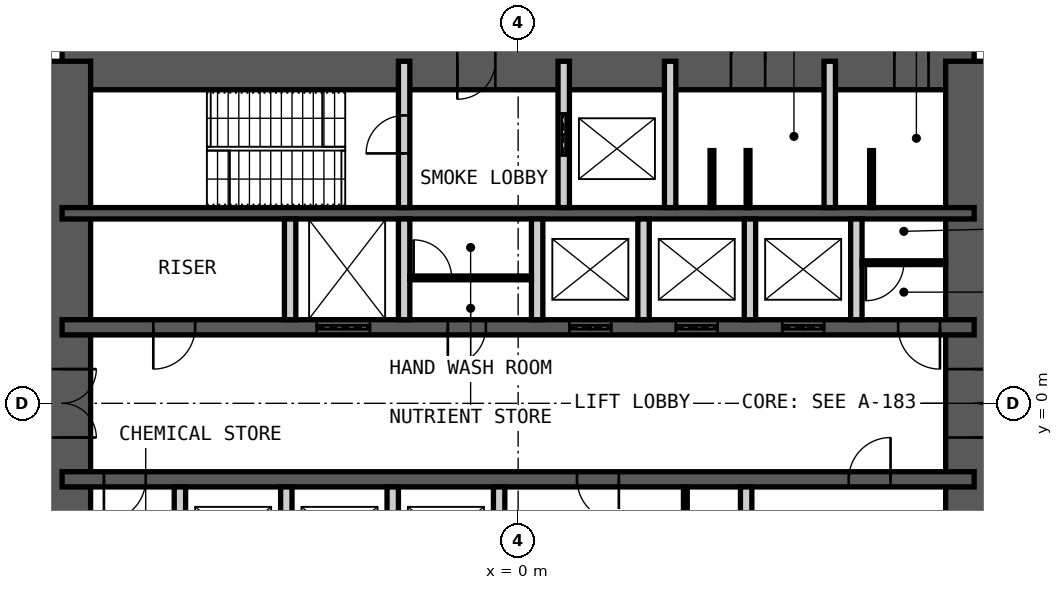
"""IFC4 building model, lengths in metres.
Left out: names, types, materials, properties, quantities, classifications, styles, units other than length and angle.
Written with IfcOpenShell. Run it as: python <this file> out.ifc"""

import sys

from ifc_helpers import new_model, si_unit, direction, frame, frame_2d, origin, place, context, subcontext, project, spatial, rectangle, extrude, element, fill, save


model = new_model("IFC4")
c1 = context("Model", 3, precision=1e-05, world=origin(), true_north=direction((0.0, 1.0)))
c2 = subcontext(c1, "Body", "Model", "MODEL_VIEW")
j1 = project(units=[si_unit("LENGTHUNIT", "METRE"), si_unit("PLANEANGLEUNIT", "RADIAN")], contexts=[c1])
p1 = place(None, origin())
s1 = spatial("IfcSite", under=j1, at=p1, CompositionType="ELEMENT")
p2 = place(p1, origin())
s2 = spatial("IfcBuilding", under=s1, at=p2, CompositionType="ELEMENT")
p3 = place(p2, frame((0.0, 0.0, 17.0)))
s3 = spatial("IfcBuildingStorey", under=s2, at=p3, CompositionType="ELEMENT", Elevation=17.0)
p4 = place(p3, frame((-12.0, 9.0, 0.0), z_axis=(0.0, 0.0, 1.0), x_axis=(1.0, 0.0, 0.0)))
e1 = element("IfcWall", 1, at=p4, inside=s3, PredefinedType="SHEAR", context=c2, shape_type="SweptSolid", body=[
    extrude(rectangle(XDim=24.0, YDim=1.5, at=frame_2d((12.0, 0.0))), origin(), (0.0, 0.0, 1.0), 5.0),
])
p5 = place(p4, frame((10.4, 0.0, 0.0)))
e2 = element("IfcOpeningElement", 2, at=p5, cuts=e1, PredefinedType="OPENING", context=c2, shape_type="SweptSolid", body=[
    extrude(rectangle(XDim=1.0, YDim=2.1, at=frame_2d((0.5, 1.05))), frame((0.0, 0.76, 0.0), z_axis=(0.0, -1.0, 0.0), x_axis=(1.0, 0.0, 0.0)), (0.0, 0.0, 1.0), 1.52),
])
p6 = place(p4, frame((17.6, 0.0, 0.0)))
e3 = element("IfcOpeningElement", 3, at=p6, cuts=e1, PredefinedType="OPENING", context=c2, shape_type="SweptSolid", body=[
    extrude(rectangle(XDim=0.9, YDim=2.1, at=frame_2d((0.45, 1.05))), frame((0.0, 0.76, 0.0), z_axis=(0.0, -1.0, 0.0), x_axis=(1.0, 0.0, 0.0)), (0.0, 0.0, 1.0), 1.52),
])
p7 = place(p4, frame((21.9, 0.0, 0.0)))
e4 = element("IfcOpeningElement", 4, at=p7, cuts=e1, PredefinedType="OPENING", context=c2, shape_type="SweptSolid", body=[
    extrude(rectangle(XDim=0.9, YDim=2.1, at=frame_2d((0.45, 1.05))), frame((0.0, 0.76, 0.0), z_axis=(0.0, -1.0, 0.0), x_axis=(1.0, 0.0, 0.0)), (0.0, 0.0, 1.0), 1.52),
])
p8 = place(p3, frame((12.0, -9.0, 0.0), z_axis=(0.0, 0.0, 1.0), x_axis=(0.0, 1.0, 0.0)))
e5 = element("IfcWall", 5, at=p8, inside=s3, PredefinedType="SHEAR", context=c2, shape_type="SweptSolid", body=[
    extrude(rectangle(XDim=18.0, YDim=1.5, at=frame_2d((9.0, 0.0))), origin(), (0.0, 0.0, 1.0), 5.0),
])
p9 = place(p8, frame((8.1, 0.0, 0.0)))
e6 = element("IfcOpeningElement", 6, at=p9, cuts=e5, PredefinedType="OPENING", context=c2, shape_type="SweptSolid", body=[
    extrude(rectangle(XDim=1.8, YDim=2.1, at=frame_2d((0.9, 1.05))), frame((0.0, 0.76, 0.0), z_axis=(0.0, -1.0, 0.0), x_axis=(1.0, 0.0, 0.0)), (0.0, 0.0, 1.0), 1.52),
])
p10 = place(p3, frame((-12.0, -9.0, 0.0), z_axis=(0.0, 0.0, 1.0), x_axis=(0.0, 1.0, 0.0)))
e7 = element("IfcWall", 7, at=p10, inside=s3, PredefinedType="SHEAR", context=c2, shape_type="SweptSolid", body=[
    extrude(rectangle(XDim=18.0, YDim=1.5, at=frame_2d((9.0, 0.0))), origin(), (0.0, 0.0, 1.0), 5.0),
])
p11 = place(p10, frame((8.1, 0.0, 0.0)))
e8 = element("IfcOpeningElement", 8, at=p11, cuts=e7, PredefinedType="OPENING", context=c2, shape_type="SweptSolid", body=[
    extrude(rectangle(XDim=1.8, YDim=2.1, at=frame_2d((0.9, 1.05))), frame((0.0, 0.76, 0.0), z_axis=(0.0, -1.0, 0.0), x_axis=(1.0, 0.0, 0.0)), (0.0, 0.0, 1.0), 1.52),
])
p12 = place(p3, frame((-12.0, 5.0, 0.0), z_axis=(0.0, 0.0, 1.0), x_axis=(1.0, 0.0, 0.0)))
e9 = element("IfcWall", 9, at=p12, inside=s3, PredefinedType="SHEAR", context=c2, shape_type="SweptSolid", body=[
    extrude(rectangle(XDim=24.0, YDim=0.3, at=frame_2d((12.0, 0.0))), origin(), (0.0, 0.0, 1.0), 5.0),
])
p13 = place(p3, frame((-12.0, 2.0, 0.0), z_axis=(0.0, 0.0, 1.0), x_axis=(1.0, 0.0, 0.0)))
e10 = element("IfcWall", 10, at=p13, inside=s3, PredefinedType="SHEAR", context=c2, shape_type="SweptSolid", body=[
    extrude(rectangle(XDim=24.0, YDim=0.4, at=frame_2d((12.0, 0.0))), origin(), (0.0, 0.0, 1.0), 5.0),
])
p14 = place(p13, frame((2.4, 0.0, 0.0)))
e11 = element("IfcOpeningElement", 11, at=p14, cuts=e10, PredefinedType="OPENING", context=c2, shape_type="SweptSolid", body=[
    extrude(rectangle(XDim=1.1, YDim=2.1, at=frame_2d((0.55, 1.05))), frame((0.0, 0.21, 0.0), z_axis=(0.0, -1.0, 0.0), x_axis=(1.0, 0.0, 0.0)), (0.0, 0.0, 1.0), 0.42),
])
p15 = place(p13, frame((22.0, 0.0, 0.0)))
e12 = element("IfcOpeningElement", 12, at=p15, cuts=e10, PredefinedType="OPENING", context=c2, shape_type="SweptSolid", body=[
    extrude(rectangle(XDim=1.1, YDim=2.1, at=frame_2d((0.55, 1.05))), frame((0.0, 0.21, 0.0), z_axis=(0.0, -1.0, 0.0), x_axis=(1.0, 0.0, 0.0)), (0.0, 0.0, 1.0), 0.42),
])
p16 = place(p13, frame((10.15, 0.0, 0.0)))
e13 = element("IfcOpeningElement", 13, at=p16, cuts=e10, PredefinedType="OPENING", context=c2, shape_type="SweptSolid", body=[
    extrude(rectangle(XDim=1.0, YDim=2.1, at=frame_2d((0.5, 1.05))), frame((0.0, 0.21, 0.0), z_axis=(0.0, -1.0, 0.0), x_axis=(1.0, 0.0, 0.0)), (0.0, 0.0, 1.0), 0.42),
])
p17 = place(p13, frame((6.7, 0.0, 0.0)))
e14 = element("IfcOpeningElement", 14, at=p17, cuts=e10, PredefinedType="OPENING", context=c2, shape_type="SweptSolid", body=[
    extrude(rectangle(XDim=1.4, YDim=2.4, at=frame_2d((0.7, 1.2))), frame((0.0, 0.21, 0.0), z_axis=(0.0, -1.0, 0.0), x_axis=(1.0, 0.0, 0.0)), (0.0, 0.0, 1.0), 0.42),
])
p18 = place(p13, frame((13.35, 0.0, 0.0)))
e15 = element("IfcOpeningElement", 15, at=p18, cuts=e10, PredefinedType="OPENING", context=c2, shape_type="SweptSolid", body=[
    extrude(rectangle(XDim=1.1, YDim=2.4, at=frame_2d((0.55, 1.2))), frame((0.0, 0.21, 0.0), z_axis=(0.0, -1.0, 0.0), x_axis=(1.0, 0.0, 0.0)), (0.0, 0.0, 1.0), 0.42),
])
p19 = place(p13, frame((16.15, 0.0, 0.0)))
e16 = element("IfcOpeningElement", 16, at=p19, cuts=e10, PredefinedType="OPENING", context=c2, shape_type="SweptSolid", body=[
    extrude(rectangle(XDim=1.1, YDim=2.4, at=frame_2d((0.55, 1.2))), frame((0.0, 0.21, 0.0), z_axis=(0.0, -1.0, 0.0), x_axis=(1.0, 0.0, 0.0)), (0.0, 0.0, 1.0), 0.42),
])
p20 = place(p13, frame((18.95, 0.0, 0.0)))
e17 = element("IfcOpeningElement", 17, at=p20, cuts=e10, PredefinedType="OPENING", context=c2, shape_type="SweptSolid", body=[
    extrude(rectangle(XDim=1.1, YDim=2.4, at=frame_2d((0.55, 1.2))), frame((0.0, 0.21, 0.0), z_axis=(0.0, -1.0, 0.0), x_axis=(1.0, 0.0, 0.0)), (0.0, 0.0, 1.0), 0.42),
])
p21 = place(p3, frame((-12.0, -2.0, 0.0), z_axis=(0.0, 0.0, 1.0), x_axis=(1.0, 0.0, 0.0)))
e18 = element("IfcWall", 18, at=p21, inside=s3, PredefinedType="SHEAR", context=c2, shape_type="SweptSolid", body=[
    extrude(rectangle(XDim=24.0, YDim=0.4, at=frame_2d((12.0, 0.0))), origin(), (0.0, 0.0, 1.0), 5.0),
])
p22 = place(p21, frame((1.1, 0.0, 0.0)))
e19 = element("IfcOpeningElement", 19, at=p22, cuts=e18, PredefinedType="OPENING", context=c2, shape_type="SweptSolid", body=[
    extrude(rectangle(XDim=1.1, YDim=2.1, at=frame_2d((0.55, 1.05))), frame((0.0, 0.21, 0.0), z_axis=(0.0, -1.0, 0.0), x_axis=(1.0, 0.0, 0.0)), (0.0, 0.0, 1.0), 0.42),
])
p23 = place(p21, frame((13.55, 0.0, 0.0)))
e20 = element("IfcOpeningElement", 20, at=p23, cuts=e18, PredefinedType="OPENING", context=c2, shape_type="SweptSolid", body=[
    extrude(rectangle(XDim=1.1, YDim=2.1, at=frame_2d((0.55, 1.05))), frame((0.0, 0.21, 0.0), z_axis=(0.0, -1.0, 0.0), x_axis=(1.0, 0.0, 0.0)), (0.0, 0.0, 1.0), 0.42),
])
p24 = place(p21, frame((20.7, 0.0, 0.0)))
e21 = element("IfcOpeningElement", 21, at=p24, cuts=e18, PredefinedType="OPENING", context=c2, shape_type="SweptSolid", body=[
    extrude(rectangle(XDim=1.1, YDim=2.1, at=frame_2d((0.55, 1.05))), frame((0.0, 0.21, 0.0), z_axis=(0.0, -1.0, 0.0), x_axis=(1.0, 0.0, 0.0)), (0.0, 0.0, 1.0), 0.42),
])
p25 = place(p3, frame((-3.0, 5.15, 0.0), z_axis=(0.0, 0.0, 1.0), x_axis=(0.0, 1.0, 0.0)))
e22 = element("IfcWall", 22, at=p25, inside=s3, PredefinedType="PARTITIONING", context=c2, shape_type="SweptSolid", body=[
    extrude(rectangle(XDim=3.85, YDim=0.3, at=frame_2d((1.925, 0.0))), origin(), (0.0, 0.0, 1.0), 4.78),
])
p26 = place(p25, frame((1.425, 0.0, 0.0)))
e23 = element("IfcOpeningElement", 23, at=p26, cuts=e22, PredefinedType="OPENING", context=c2, shape_type="SweptSolid", body=[
    extrude(rectangle(XDim=1.0, YDim=2.1, at=frame_2d((0.5, 1.05))), frame((0.0, 0.16, 0.0), z_axis=(0.0, -1.0, 0.0), x_axis=(1.0, 0.0, 0.0)), (0.0, 0.0, 1.0), 0.32),
])
p27 = place(p3, frame((1.2, 5.15, 0.0), z_axis=(0.0, 0.0, 1.0), x_axis=(0.0, 1.0, 0.0)))
e24 = element("IfcWall", 24, at=p27, inside=s3, PredefinedType="PARTITIONING", context=c2, shape_type="SweptSolid", body=[
    extrude(rectangle(XDim=3.85, YDim=0.3, at=frame_2d((1.925, 0.0))), origin(), (0.0, 0.0, 1.0), 4.78),
])
p28 = place(p27, frame((1.375, 0.0, 0.0)))
e25 = element("IfcOpeningElement", 25, at=p28, cuts=e24, PredefinedType="OPENING", context=c2, shape_type="SweptSolid", body=[
    extrude(rectangle(XDim=1.1, YDim=2.4, at=frame_2d((0.55, 1.2))), frame((0.0, 0.16, 0.0), z_axis=(0.0, -1.0, 0.0), x_axis=(1.0, 0.0, 0.0)), (0.0, 0.0, 1.0), 0.32),
])
for number, where, z_axis, x_axis in (
    (26, (4.0, 5.15, 0.0), (0.0, 0.0, 1.0), (0.0, 1.0, 0.0)),
    (27, (8.2, 5.15, 0.0), (0.0, 0.0, 1.0), (0.0, 1.0, 0.0)),
):
    element("IfcWall", number, at=place(p3, frame(where, z_axis=z_axis, x_axis=x_axis)), inside=s3, PredefinedType="PARTITIONING", context=c2, shape_type="SweptSolid", body=[
        extrude(rectangle(XDim=3.85, YDim=0.3, at=frame_2d((1.925, 0.0))), origin(), (0.0, 0.0, 1.0), 4.78),
    ])
for number, where, z_axis, x_axis in (
    (28, (-6.0, 2.2, 0.0), (0.0, 0.0, 1.0), (0.0, 1.0, 0.0)),
    (29, (-3.0, 2.2, 0.0), (0.0, 0.0, 1.0), (0.0, 1.0, 0.0)),
    (30, (0.5, 2.2, 0.0), (0.0, 0.0, 1.0), (0.0, 1.0, 0.0)),
    (31, (3.3, 2.2, 0.0), (0.0, 0.0, 1.0), (0.0, 1.0, 0.0)),
    (32, (6.1, 2.2, 0.0), (0.0, 0.0, 1.0), (0.0, 1.0, 0.0)),
    (33, (8.9, 2.2, 0.0), (0.0, 0.0, 1.0), (0.0, 1.0, 0.0)),
    (34, (-8.9, -4.85, 0.0), (0.0, 0.0, 1.0), (0.0, 1.0, 0.0)),
    (35, (-6.1, -4.85, 0.0), (0.0, 0.0, 1.0), (0.0, 1.0, 0.0)),
    (36, (-3.3, -4.85, 0.0), (0.0, 0.0, 1.0), (0.0, 1.0, 0.0)),
    (37, (-0.5, -4.85, 0.0), (0.0, 0.0, 1.0), (0.0, 1.0, 0.0)),
    (38, (6.0, -4.85, 0.0), (0.0, 0.0, 1.0), (0.0, 1.0, 0.0)),
):
    element("IfcWall", number, at=place(p3, frame(where, z_axis=z_axis, x_axis=x_axis)), inside=s3, PredefinedType="PARTITIONING", context=c2, shape_type="SweptSolid", body=[
        extrude(rectangle(XDim=2.65, YDim=0.3, at=frame_2d((1.325, 0.0))), origin(), (0.0, 0.0, 1.0), 4.78),
    ])
p29 = place(p3, frame((-2.85, 3.3, 0.0), z_axis=(0.0, 0.0, 1.0), x_axis=(1.0, 0.0, 0.0)))
e39 = element("IfcWall", 39, at=p29, inside=s3, PredefinedType="PARTITIONING", context=c2, shape_type="SweptSolid", body=[
    extrude(rectangle(XDim=3.2, YDim=0.1, at=frame_2d((1.6, 0.0))), origin(), (0.0, 0.0, 1.0), 4.78),
])
p30 = place(p29, frame((0.1, 0.0, 0.0)))
e40 = element("IfcOpeningElement", 40, at=p30, cuts=e39, PredefinedType="OPENING", context=c2, shape_type="SweptSolid", body=[
    extrude(rectangle(XDim=1.0, YDim=2.4, at=frame_2d((0.5, 1.2))), frame((0.0, 0.06, 0.0), z_axis=(0.0, -1.0, 0.0), x_axis=(1.0, 0.0, 0.0)), (0.0, 0.0, 1.0), 0.12),
])
p31 = place(p3, frame((4.4, -4.85, 0.0), z_axis=(0.0, 0.0, 1.0), x_axis=(0.0, 1.0, 0.0)))
e41 = element("IfcWall", 41, at=p31, inside=s3, PredefinedType="PARTITIONING", context=c2, shape_type="SweptSolid", body=[
    extrude(rectangle(XDim=2.65, YDim=0.1, at=frame_2d((1.325, 0.0))), origin(), (0.0, 0.0, 1.0), 4.78),
])
p32 = place(p31, frame((0.1, 0.0, 0.0)))
e42 = element("IfcOpeningElement", 42, at=p32, cuts=e41, PredefinedType="OPENING", context=c2, shape_type="SweptSolid", body=[
    extrude(rectangle(XDim=1.0, YDim=2.4, at=frame_2d((0.5, 1.2))), frame((0.0, 0.06, 0.0), z_axis=(0.0, -1.0, 0.0), x_axis=(1.0, 0.0, 0.0)), (0.0, 0.0, 1.0), 0.12),
])
p33 = place(p3, frame((9.05, 3.7, 0.0), z_axis=(0.0, 0.0, 1.0), x_axis=(1.0, 0.0, 0.0)))
e43 = element("IfcWall", 43, at=p33, inside=s3, PredefinedType="PARTITIONING", context=c2, shape_type="SweptSolid", body=[
    extrude(rectangle(XDim=2.2, YDim=0.1, at=frame_2d((1.1, 0.0))), origin(), (0.0, 0.0, 1.0), 4.78),
])
p34 = place(p33, frame((0.1, 0.0, 0.0)))
e44 = element("IfcOpeningElement", 44, at=p34, cuts=e43, PredefinedType="OPENING", context=c2, shape_type="SweptSolid", body=[
    extrude(rectangle(XDim=1.0, YDim=2.4, at=frame_2d((0.5, 1.2))), frame((0.0, 0.06, 0.0), z_axis=(0.0, -1.0, 0.0), x_axis=(1.0, 0.0, 0.0)), (0.0, 0.0, 1.0), 0.12),
])
for number, where, z_axis, x_axis in (
    (45, (5.1, 5.15, 0.0), (0.0, 0.0, 1.0), (0.0, 1.0, 0.0)),
    (46, (6.05, 5.15, 0.0), (0.0, 0.0, 1.0), (0.0, 1.0, 0.0)),
    (47, (9.3, 5.15, 0.0), (0.0, 0.0, 1.0), (0.0, 1.0, 0.0)),
):
    element("IfcWall", number, at=place(p3, frame(where, z_axis=z_axis, x_axis=x_axis)), inside=s3, PredefinedType="PARTITIONING", context=c2, shape_type="SweptSolid", body=[
        extrude(rectangle(XDim=1.5, YDim=0.1, at=frame_2d((0.75, 0.0))), origin(), (0.0, 0.0, 1.0), 2.1),
    ])
p35 = place(p5, origin())
e48 = element("IfcDoor", 48, at=p35, inside=s3, OperationType="SINGLE_SWING_LEFT", PredefinedType="DOOR", context=c2, shape_type="SweptSolid", body=[
    extrude(rectangle(XDim=1.0, YDim=2.1, at=frame_2d((0.5, 1.05))), frame((0.0, 0.025, 0.0), z_axis=(0.0, -1.0, 0.0), x_axis=(1.0, 0.0, 0.0)), (0.0, 0.0, 1.0), 0.05),
])
fill(e2, e48)
p36 = place(p6, origin())
e49 = element("IfcDoor", 49, at=p36, inside=s3, OperationType="SINGLE_SWING_LEFT", PredefinedType="DOOR", context=c2, shape_type="SweptSolid", body=[
    extrude(rectangle(XDim=0.9, YDim=2.1, at=frame_2d((0.45, 1.05))), frame((0.0, 0.025, 0.0), z_axis=(0.0, -1.0, 0.0), x_axis=(1.0, 0.0, 0.0)), (0.0, 0.0, 1.0), 0.05),
])
fill(e3, e49)
p37 = place(p7, origin())
e50 = element("IfcDoor", 50, at=p37, inside=s3, OperationType="SINGLE_SWING_LEFT", PredefinedType="DOOR", context=c2, shape_type="SweptSolid", body=[
    extrude(rectangle(XDim=0.9, YDim=2.1, at=frame_2d((0.45, 1.05))), frame((0.0, 0.025, 0.0), z_axis=(0.0, -1.0, 0.0), x_axis=(1.0, 0.0, 0.0)), (0.0, 0.0, 1.0), 0.05),
])
fill(e4, e50)
p38 = place(p26, origin())
e51 = element("IfcDoor", 51, at=p38, inside=s3, OperationType="SINGLE_SWING_RIGHT", PredefinedType="DOOR", context=c2, shape_type="SweptSolid", body=[
    extrude(rectangle(XDim=1.0, YDim=2.1, at=frame_2d((0.5, 1.05))), frame((0.0, 0.025, 0.0), z_axis=(0.0, -1.0, 0.0), x_axis=(1.0, 0.0, 0.0)), (0.0, 0.0, 1.0), 0.05),
])
fill(e23, e51)
p39 = place(p14, origin())
e52 = element("IfcDoor", 52, at=p39, inside=s3, OperationType="SINGLE_SWING_LEFT", PredefinedType="DOOR", context=c2, shape_type="SweptSolid", body=[
    extrude(rectangle(XDim=1.1, YDim=2.1, at=frame_2d((0.55, 1.05))), frame((0.0, 0.025, 0.0), z_axis=(0.0, -1.0, 0.0), x_axis=(1.0, 0.0, 0.0)), (0.0, 0.0, 1.0), 0.05),
])
fill(e11, e52)
p40 = place(p22, origin())
e53 = element("IfcDoor", 53, at=p40, inside=s3, OperationType="SINGLE_SWING_LEFT", PredefinedType="DOOR", context=c2, shape_type="SweptSolid", body=[
    extrude(rectangle(XDim=1.1, YDim=2.1, at=frame_2d((0.55, 1.05))), frame((0.0, 0.025, 0.0), z_axis=(0.0, -1.0, 0.0), x_axis=(1.0, 0.0, 0.0)), (0.0, 0.0, 1.0), 0.05),
])
fill(e19, e53)
p41 = place(p15, origin())
e54 = element("IfcDoor", 54, at=p41, inside=s3, OperationType="SINGLE_SWING_RIGHT", PredefinedType="DOOR", context=c2, shape_type="SweptSolid", body=[
    extrude(rectangle(XDim=1.1, YDim=2.1, at=frame_2d((0.55, 1.05))), frame((0.0, 0.025, 0.0), z_axis=(0.0, -1.0, 0.0), x_axis=(1.0, 0.0, 0.0)), (0.0, 0.0, 1.0), 0.05),
])
fill(e12, e54)
p42 = place(p16, origin())
e55 = element("IfcDoor", 55, at=p42, inside=s3, OperationType="SINGLE_SWING_LEFT", PredefinedType="DOOR", context=c2, shape_type="SweptSolid", body=[
    extrude(rectangle(XDim=1.0, YDim=2.1, at=frame_2d((0.5, 1.05))), frame((0.0, 0.025, 0.0), z_axis=(0.0, -1.0, 0.0), x_axis=(1.0, 0.0, 0.0)), (0.0, 0.0, 1.0), 0.05),
])
fill(e13, e55)
p43 = place(p23, origin())
e56 = element("IfcDoor", 56, at=p43, inside=s3, OperationType="SINGLE_SWING_RIGHT", PredefinedType="DOOR", context=c2, shape_type="SweptSolid", body=[
    extrude(rectangle(XDim=1.1, YDim=2.1, at=frame_2d((0.55, 1.05))), frame((0.0, 0.025, 0.0), z_axis=(0.0, -1.0, 0.0), x_axis=(1.0, 0.0, 0.0)), (0.0, 0.0, 1.0), 0.05),
])
fill(e20, e56)
p44 = place(p24, origin())
e57 = element("IfcDoor", 57, at=p44, inside=s3, OperationType="SINGLE_SWING_LEFT", PredefinedType="DOOR", context=c2, shape_type="SweptSolid", body=[
    extrude(rectangle(XDim=1.1, YDim=2.1, at=frame_2d((0.55, 1.05))), frame((0.0, 0.025, 0.0), z_axis=(0.0, -1.0, 0.0), x_axis=(1.0, 0.0, 0.0)), (0.0, 0.0, 1.0), 0.05),
])
fill(e21, e57)
p45 = place(p9, origin())
e58 = element("IfcDoor", 58, at=p45, inside=s3, OperationType="DOUBLE_DOOR_DOUBLE_SWING", PredefinedType="DOOR", context=c2, shape_type="SweptSolid", body=[
    extrude(rectangle(XDim=1.8, YDim=2.1, at=frame_2d((0.9, 1.05))), frame((0.0, 0.025, 0.0), z_axis=(0.0, -1.0, 0.0), x_axis=(1.0, 0.0, 0.0)), (0.0, 0.0, 1.0), 0.05),
])
fill(e6, e58)
p46 = place(p11, origin())
e59 = element("IfcDoor", 59, at=p46, inside=s3, OperationType="DOUBLE_DOOR_DOUBLE_SWING", PredefinedType="DOOR", context=c2, shape_type="SweptSolid", body=[
    extrude(rectangle(XDim=1.8, YDim=2.1, at=frame_2d((0.9, 1.05))), frame((0.0, 0.025, 0.0), z_axis=(0.0, -1.0, 0.0), x_axis=(1.0, 0.0, 0.0)), (0.0, 0.0, 1.0), 0.05),
])
fill(e8, e59)
p47 = place(p28, origin())
e60 = element("IfcDoor", 60, at=p47, inside=s3, OperationType="DOUBLE_DOOR_SLIDING", PredefinedType="DOOR", context=c2, shape_type="SweptSolid", body=[
    extrude(rectangle(XDim=1.1, YDim=2.4, at=frame_2d((0.55, 1.2))), frame((0.0, 0.025, 0.0), z_axis=(0.0, -1.0, 0.0), x_axis=(1.0, 0.0, 0.0)), (0.0, 0.0, 1.0), 0.05),
])
fill(e25, e60)
p48 = place(p17, origin())
e61 = element("IfcDoor", 61, at=p48, inside=s3, OperationType="DOUBLE_DOOR_SLIDING", PredefinedType="DOOR", context=c2, shape_type="SweptSolid", body=[
    extrude(rectangle(XDim=1.4, YDim=2.4, at=frame_2d((0.7, 1.2))), frame((0.0, 0.025, 0.0), z_axis=(0.0, -1.0, 0.0), x_axis=(1.0, 0.0, 0.0)), (0.0, 0.0, 1.0), 0.05),
])
fill(e14, e61)
p49 = place(p18, origin())
e62 = element("IfcDoor", 62, at=p49, inside=s3, OperationType="DOUBLE_DOOR_SLIDING", PredefinedType="DOOR", context=c2, shape_type="SweptSolid", body=[
    extrude(rectangle(XDim=1.1, YDim=2.4, at=frame_2d((0.55, 1.2))), frame((0.0, 0.025, 0.0), z_axis=(0.0, -1.0, 0.0), x_axis=(1.0, 0.0, 0.0)), (0.0, 0.0, 1.0), 0.05),
])
fill(e15, e62)
p50 = place(p19, origin())
e63 = element("IfcDoor", 63, at=p50, inside=s3, OperationType="DOUBLE_DOOR_SLIDING", PredefinedType="DOOR", context=c2, shape_type="SweptSolid", body=[
    extrude(rectangle(XDim=1.1, YDim=2.4, at=frame_2d((0.55, 1.2))), frame((0.0, 0.025, 0.0), z_axis=(0.0, -1.0, 0.0), x_axis=(1.0, 0.0, 0.0)), (0.0, 0.0, 1.0), 0.05),
])
fill(e16, e63)
p51 = place(p20, origin())
e64 = element("IfcDoor", 64, at=p51, inside=s3, OperationType="DOUBLE_DOOR_SLIDING", PredefinedType="DOOR", context=c2, shape_type="SweptSolid", body=[
    extrude(rectangle(XDim=1.1, YDim=2.4, at=frame_2d((0.55, 1.2))), frame((0.0, 0.025, 0.0), z_axis=(0.0, -1.0, 0.0), x_axis=(1.0, 0.0, 0.0)), (0.0, 0.0, 1.0), 0.05),
])
fill(e17, e64)
p52 = place(p30, origin())
e65 = element("IfcDoor", 65, at=p52, inside=s3, OperationType="SINGLE_SWING_RIGHT", PredefinedType="DOOR", context=c2, shape_type="SweptSolid", body=[
    extrude(rectangle(XDim=1.0, YDim=2.4, at=frame_2d((0.5, 1.2))), frame((0.0, 0.025, 0.0), z_axis=(0.0, -1.0, 0.0), x_axis=(1.0, 0.0, 0.0)), (0.0, 0.0, 1.0), 0.05),
])
fill(e40, e65)
p53 = place(p34, origin())
e66 = element("IfcDoor", 66, at=p53, inside=s3, OperationType="SINGLE_SWING_LEFT", PredefinedType="DOOR", context=c2, shape_type="SweptSolid", body=[
    extrude(rectangle(XDim=1.0, YDim=2.4, at=frame_2d((0.5, 1.2))), frame((0.0, 0.025, 0.0), z_axis=(0.0, -1.0, 0.0), x_axis=(1.0, 0.0, 0.0)), (0.0, 0.0, 1.0), 0.05),
])
fill(e44, e66)
save(model, sys.argv[1])
